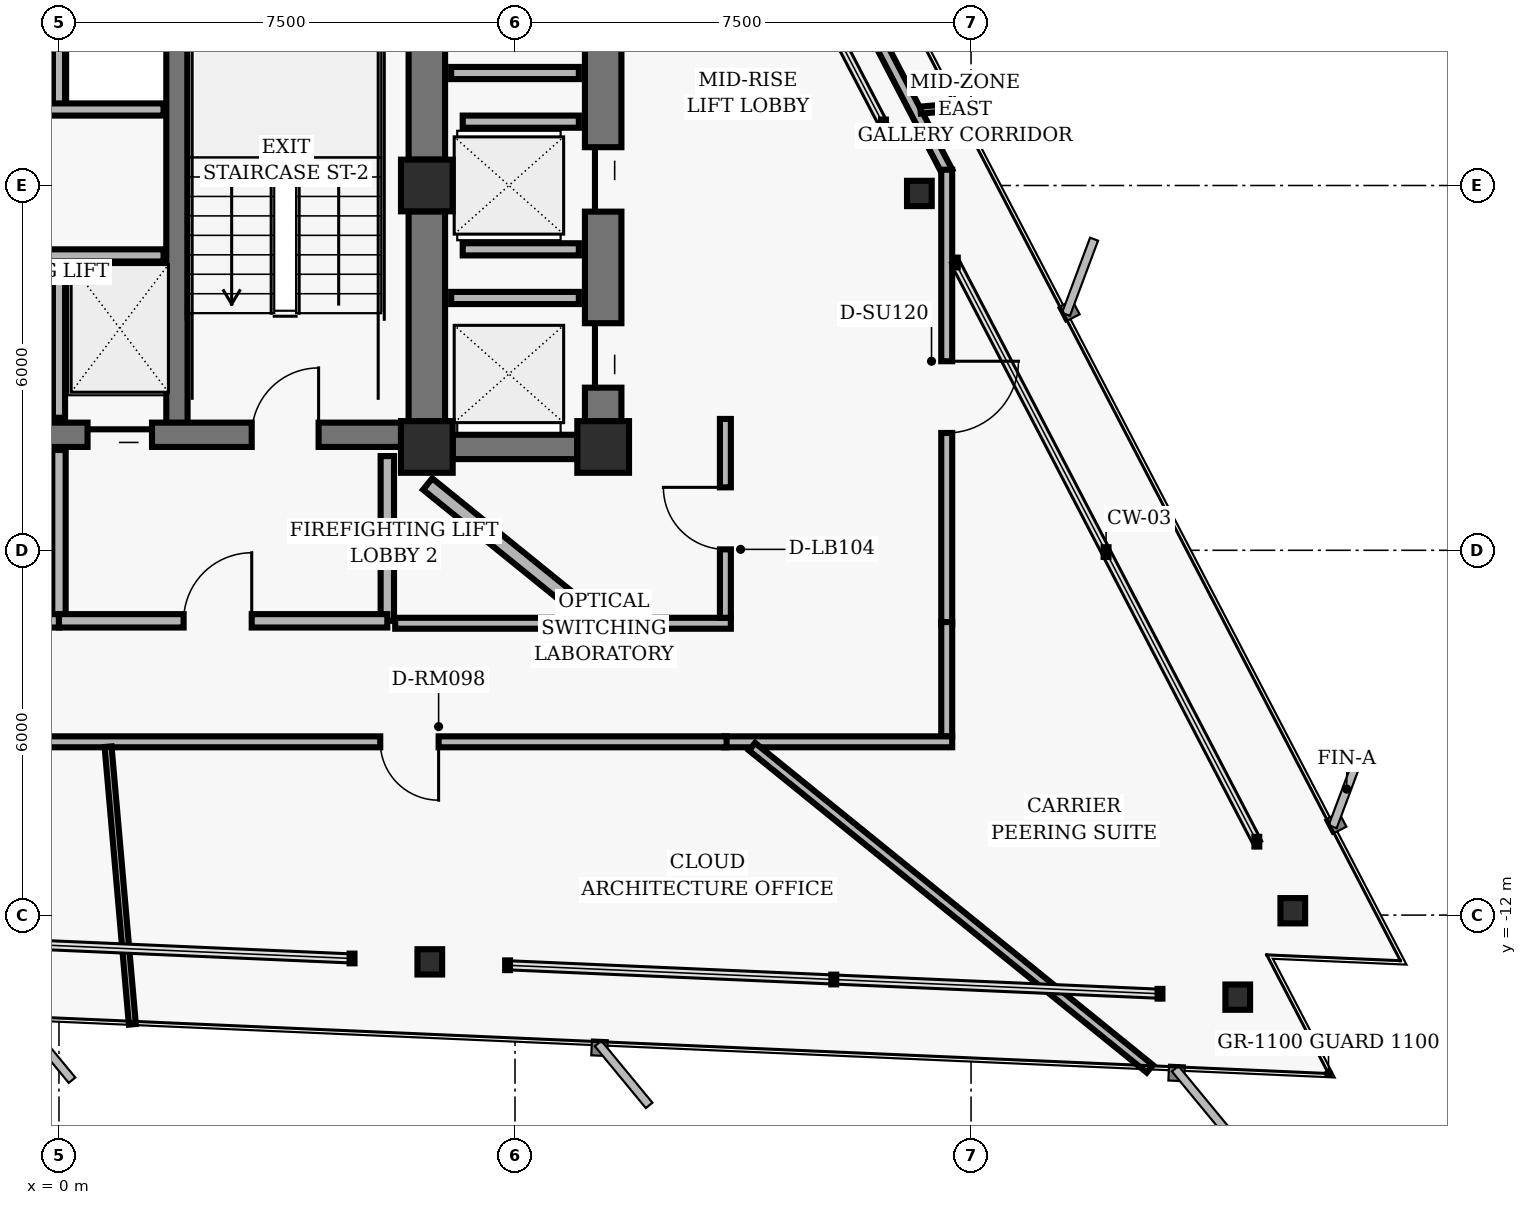
"""IFC4 building model, lengths in metres.
Left out: names, types, materials, properties, quantities, classifications, styles, units other than length and angle.
Written with IfcOpenShell. Run it as: python <this file> out.ifc"""

import sys

from ifc_helpers import new_model, si_unit, direction, frame, frame_2d, origin, origin_2d, place, context, subcontext, project, spatial, rectangle, hollow_rectangle, i_section, extrude, element, fill, save


model = new_model("IFC4")
c1 = context("Model", 3, precision=1e-05, world=origin(), true_north=direction((0.0, 1.0)))
c2 = subcontext(c1, "Body", "Model", "MODEL_VIEW")
j1 = project(units=[si_unit("LENGTHUNIT", "METRE"), si_unit("PLANEANGLEUNIT", "RADIAN")], contexts=[c1])
p1 = place(None, origin())
s1 = spatial("IfcSite", under=j1, at=p1, CompositionType="ELEMENT")
p2 = place(p1, origin())
s2 = spatial("IfcBuilding", under=s1, at=p2, CompositionType="ELEMENT")
p3 = place(p2, frame((0.0, 0.0, 125.92)))
s3 = spatial("IfcBuildingStorey", under=s2, at=p3, CompositionType="ELEMENT", Elevation=125.92)
for number, where, z_axis, x_axis in (
    (1, (6.05, 0.0, 0.0), (0.0, 0.0, 1.0), (1.0, 0.0, 0.0)),
    (2, (6.05, -4.3, 0.0), (0.0, 0.0, 1.0), (1.0, 0.0, 0.0)),
    (3, (8.95, -4.3, 0.0), (0.0, 0.0, 1.0), (1.0, 0.0, 0.0)),
):
    element("IfcColumn", number, at=place(p3, frame(where, z_axis=z_axis, x_axis=x_axis)), inside=s3, PredefinedType="COLUMN", context=c2, shape_type="SweptSolid", body=[
        extrude(hollow_rectangle(XDim=0.85, YDim=0.85, WallThickness=0.055, InnerFilletRadius=0.02, OuterFilletRadius=0.04, at=origin_2d()), origin(), (0.0, 0.0, 1.0), 3.04),
    ])
p4 = place(p3, frame((6.05, 0.425, 0.0), z_axis=(0.0, 0.0, 1.0), x_axis=(0.0, 1.0, 0.0)))
e4 = element("IfcWall", 4, at=p4, inside=s3, PredefinedType="SHEAR", context=c2, shape_type="SweptSolid", body=[
    extrude(rectangle(XDim=3.65, YDim=0.6, at=frame_2d((1.825, 0.0))), origin(), (0.0, 0.0, 1.0), 2.788),
])
p5 = place(p3, frame((6.05, -3.875, 0.0), z_axis=(0.0, 0.0, 1.0), x_axis=(0.0, 1.0, 0.0)))
e5 = element("IfcWall", 5, at=p5, inside=s3, PredefinedType="SHEAR", context=c2, shape_type="SweptSolid", body=[
    extrude(rectangle(XDim=3.45, YDim=0.6, at=frame_2d((1.725, 0.0))), origin(), (0.0, 0.0, 1.0), 2.788),
])
p6 = place(p3, frame((1.94, -4.1, 0.0), z_axis=(0.0, 0.0, 1.0), x_axis=(0.0, 1.0, 0.0)))
e6 = element("IfcWall", 6, at=p6, inside=s3, PredefinedType="SHEAR", context=c2, shape_type="SweptSolid", body=[
    extrude(rectangle(XDim=8.2, YDim=0.35, at=frame_2d((4.1, 0.0))), origin(), (0.0, 0.0, 1.0), 2.788),
])
p7 = place(p3, frame((-5.625, -4.1, 0.0), z_axis=(0.0, 0.0, 1.0), x_axis=(1.0, 0.0, 0.0)))
e7 = element("IfcWall", 7, at=p7, inside=s3, PredefinedType="SHEAR", context=c2, shape_type="SweptSolid", body=[
    extrude(rectangle(XDim=11.25, YDim=0.4, at=frame_2d((5.625, 0.0))), origin(), (0.0, 0.0, 1.0), 2.788),
])
p8 = place(p7, frame((1.355, 0.0, 0.0)))
e8 = element("IfcOpeningElement", 8, at=p8, cuts=e7, PredefinedType="OPENING", context=c2, shape_type="SweptSolid", body=[
    extrude(rectangle(XDim=1.1, YDim=2.04, at=frame_2d((0.55, 1.02))), frame((0.0, 0.21, 0.0), z_axis=(0.0, -1.0, 0.0), x_axis=(1.0, 0.0, 0.0)), (0.0, 0.0, 1.0), 0.42),
])
p9 = place(p7, frame((8.795, 0.0, 0.0)))
e9 = element("IfcOpeningElement", 9, at=p9, cuts=e7, PredefinedType="OPENING", context=c2, shape_type="SweptSolid", body=[
    extrude(rectangle(XDim=1.1, YDim=2.04, at=frame_2d((0.55, 1.02))), frame((0.0, 0.21, 0.0), z_axis=(0.0, -1.0, 0.0), x_axis=(1.0, 0.0, 0.0)), (0.0, 0.0, 1.0), 0.42),
])
p10 = place(p7, frame((4.095, 0.0, 0.0)))
e10 = element("IfcOpeningElement", 10, at=p10, cuts=e7, PredefinedType="OPENING", context=c2, shape_type="SweptSolid", body=[
    extrude(rectangle(XDim=1.06, YDim=2.04, at=frame_2d((0.53, 1.02))), frame((0.0, 0.21, 0.0), z_axis=(0.0, -1.0, 0.0), x_axis=(1.0, 0.0, 0.0)), (0.0, 0.0, 1.0), 0.42),
])
p11 = place(p7, frame((6.095, 0.0, 0.0)))
e11 = element("IfcOpeningElement", 11, at=p11, cuts=e7, PredefinedType="OPENING", context=c2, shape_type="SweptSolid", body=[
    extrude(rectangle(XDim=1.06, YDim=2.04, at=frame_2d((0.53, 1.02))), frame((0.0, 0.21, 0.0), z_axis=(0.0, -1.0, 0.0), x_axis=(1.0, 0.0, 0.0)), (0.0, 0.0, 1.0), 0.42),
])
p12 = place(p3, frame((8.95, -3.875, 0.0), z_axis=(0.0, 0.0, 1.0), x_axis=(0.0, 1.0, 0.0)))
e12 = element("IfcWall", 12, at=p12, inside=s3, PredefinedType="SHEAR", context=c2, shape_type="SweptSolid", body=[
    extrude(rectangle(XDim=7.95, YDim=0.6, at=frame_2d((3.975, 0.0))), origin(), (0.0, 0.0, 1.0), 2.788),
])
p13 = place(p12, frame((0.55, 0.0, 0.0)))
e13 = element("IfcOpeningElement", 13, at=p13, cuts=e12, PredefinedType="OPENING", context=c2, shape_type="SweptSolid", body=[
    extrude(rectangle(XDim=1.06, YDim=2.04, at=frame_2d((0.53, 1.02))), frame((0.0, 0.31, 0.0), z_axis=(0.0, -1.0, 0.0), x_axis=(1.0, 0.0, 0.0)), (0.0, 0.0, 1.0), 0.62),
])
p14 = place(p12, frame((3.445, 0.0, 0.0)))
e14 = element("IfcOpeningElement", 14, at=p14, cuts=e12, PredefinedType="OPENING", context=c2, shape_type="SweptSolid", body=[
    extrude(rectangle(XDim=1.06, YDim=2.04, at=frame_2d((0.53, 1.02))), frame((0.0, 0.31, 0.0), z_axis=(0.0, -1.0, 0.0), x_axis=(1.0, 0.0, 0.0)), (0.0, 0.0, 1.0), 0.62),
])
p15 = place(p12, frame((6.33, 0.0, 0.0)))
e15 = element("IfcOpeningElement", 15, at=p15, cuts=e12, PredefinedType="OPENING", context=c2, shape_type="SweptSolid", body=[
    extrude(rectangle(XDim=1.06, YDim=2.04, at=frame_2d((0.53, 1.02))), frame((0.0, 0.31, 0.0), z_axis=(0.0, -1.0, 0.0), x_axis=(1.0, 0.0, 0.0)), (0.0, 0.0, 1.0), 0.62),
])
p16 = place(p3, frame((6.475, -4.3, 0.0), z_axis=(0.0, 0.0, 1.0), x_axis=(1.0, 0.0, 0.0)))
e16 = element("IfcWall", 16, at=p16, inside=s3, PredefinedType="SHEAR", context=c2, shape_type="SweptSolid", body=[
    extrude(rectangle(XDim=2.05, YDim=0.4, at=frame_2d((1.025, 0.0))), origin(), (0.0, 0.0, 1.0), 2.788),
])
for number, where, z_axis, x_axis in (
    (17, (20.292, -11.928, 0.0), (0.0, 0.0, 1.0), (1.0, 0.0, 0.0)),
    (18, (14.15, -0.131, 0.0), (0.0, 0.0, 1.0), (1.0, 0.0, 0.0)),
    (19, (6.099, -12.769, 0.0), (0.0, 0.0, 1.0), (1.0, 0.0, 0.0)),
    (20, (19.386, -13.349, 0.0), (0.0, 0.0, 1.0), (1.0, 0.0, 0.0)),
):
    element("IfcColumn", number, at=place(p3, frame(where, z_axis=z_axis, x_axis=x_axis)), inside=s3, PredefinedType="COLUMN", context=c2, shape_type="SweptSolid", body=[
        extrude(i_section(OverallWidth=0.406, OverallDepth=0.416, WebThickness=0.03, FlangeThickness=0.048, FilletRadius=0.02, at=origin_2d()), origin(), (0.0, 0.0, 1.0), 3.04),
    ])
p17 = place(p3, frame((0.0, -3.82, 0.0), z_axis=(0.0, 0.0, 1.0), x_axis=(0.0, 1.0, 0.0)))
e21 = element("IfcWall", 21, at=p17, inside=s3, PredefinedType="PARTITIONING", context=c2, shape_type="SweptSolid", body=[
    extrude(rectangle(XDim=2.67, YDim=0.2, at=frame_2d((1.335, 0.0))), origin(), (0.0, 0.0, 1.0), 2.763),
])
p18 = place(p3, frame((-1.72, -1.15, 0.0), z_axis=(0.0, 0.0, 1.0), x_axis=(1.0, 0.0, 0.0)))
e22 = element("IfcWall", 22, at=p18, inside=s3, PredefinedType="PARTITIONING", context=c2, shape_type="SweptSolid", body=[
    extrude(rectangle(XDim=3.44, YDim=0.2, at=frame_2d((1.72, 0.0))), origin(), (0.0, 0.0, 1.0), 2.763),
])
p19 = place(p3, frame((5.4, -7.16, 0.0), z_axis=(0.0, 0.0, 1.0), x_axis=(0.0, 1.0, 0.0)))
e23 = element("IfcWall", 23, at=p19, inside=s3, PredefinedType="PARTITIONING", context=c2, shape_type="SweptSolid", body=[
    extrude(rectangle(XDim=2.71, YDim=0.22, at=frame_2d((1.355, 0.0))), origin(), (0.0, 0.0, 1.0), 2.763),
])
p20 = place(p3, frame((0.0, -7.16, 0.0), z_axis=(0.0, 0.0, 1.0), x_axis=(0.0, 1.0, 0.0)))
e24 = element("IfcWall", 24, at=p20, inside=s3, PredefinedType="PARTITIONING", context=c2, shape_type="SweptSolid", body=[
    extrude(rectangle(XDim=2.81, YDim=0.22, at=frame_2d((1.405, 0.0))), origin(), (0.0, 0.0, 1.0), 2.763),
])
p21 = place(p3, frame((-5.4, -7.16, 0.0), z_axis=(0.0, 0.0, 1.0), x_axis=(1.0, 0.0, 0.0)))
e25 = element("IfcWall", 25, at=p21, inside=s3, PredefinedType="PARTITIONING", context=c2, shape_type="SweptSolid", body=[
    extrude(rectangle(XDim=5.4, YDim=0.22, at=frame_2d((2.7, 0.0))), origin(), (0.0, 0.0, 1.0), 2.33),
])
p22 = place(p21, frame((2.05, 0.0, 0.0)))
e26 = element("IfcOpeningElement", 26, at=p22, cuts=e25, PredefinedType="OPENING", context=c2, shape_type="SweptSolid", body=[
    extrude(rectangle(XDim=1.12, YDim=2.02, at=frame_2d((0.56, 1.01))), frame((0.0, 0.12, 0.0), z_axis=(0.0, -1.0, 0.0), x_axis=(1.0, 0.0, 0.0)), (0.0, 0.0, 1.0), 0.24),
])
p23 = place(p3, frame((0.0, -7.16, 0.0), z_axis=(0.0, 0.0, 1.0), x_axis=(1.0, 0.0, 0.0)))
e27 = element("IfcWall", 27, at=p23, inside=s3, PredefinedType="PARTITIONING", context=c2, shape_type="SweptSolid", body=[
    extrude(rectangle(XDim=5.4, YDim=0.22, at=frame_2d((2.7, 0.0))), origin(), (0.0, 0.0, 1.0), 2.33),
])
p24 = place(p23, frame((2.05, 0.0, 0.0)))
e28 = element("IfcOpeningElement", 28, at=p24, cuts=e27, PredefinedType="OPENING", context=c2, shape_type="SweptSolid", body=[
    extrude(rectangle(XDim=1.12, YDim=2.02, at=frame_2d((0.56, 1.01))), frame((0.0, 0.12, 0.0), z_axis=(0.0, -1.0, 0.0), x_axis=(1.0, 0.0, 0.0)), (0.0, 0.0, 1.0), 0.24),
])
p25 = place(p3, frame((0.0, 1.25, 0.0), z_axis=(0.0, 0.0, 1.0), x_axis=(0.0, 1.0, 0.0)))
e29 = element("IfcWall", 29, at=p25, inside=s3, PredefinedType="PARTITIONING", context=c2, shape_type="SweptSolid", body=[
    extrude(rectangle(XDim=2.77, YDim=0.2, at=frame_2d((1.385, 0.0))), origin(), (0.0, 0.0, 1.0), 2.763),
])
p26 = place(p3, frame((-1.72, 1.25, 0.0), z_axis=(0.0, 0.0, 1.0), x_axis=(1.0, 0.0, 0.0)))
e30 = element("IfcWall", 30, at=p26, inside=s3, PredefinedType="PARTITIONING", context=c2, shape_type="SweptSolid", body=[
    extrude(rectangle(XDim=3.44, YDim=0.2, at=frame_2d((1.72, 0.0))), origin(), (0.0, 0.0, 1.0), 2.763),
])
for number, where, z_axis, x_axis in (
    (31, (6.45, -1.85, 0.0), (0.0, 0.0, 1.0), (1.0, 0.0, 0.0)),
    (32, (6.45, 1.85, 0.0), (0.0, 0.0, 1.0), (1.0, 0.0, 0.0)),
):
    element("IfcWall", number, at=place(p3, frame(where, z_axis=z_axis, x_axis=x_axis)), inside=s3, PredefinedType="PARTITIONING", context=c2, shape_type="SweptSolid", body=[
        extrude(rectangle(XDim=2.1, YDim=0.2, at=frame_2d((1.05, 0.0))), origin(), (0.0, 0.0, 1.0), 2.763),
    ])
for number, where, z_axis, x_axis in (
    (33, (6.64, -1.05, 0.0), (0.0, 0.0, 1.0), (1.0, 0.0, 0.0)),
    (34, (6.64, 1.05, 0.0), (0.0, 0.0, 1.0), (1.0, 0.0, 0.0)),
):
    element("IfcWall", number, at=place(p3, frame(where, z_axis=z_axis, x_axis=x_axis)), inside=s3, PredefinedType="PARTITIONING", context=c2, shape_type="SweptSolid", body=[
        extrude(rectangle(XDim=1.91, YDim=0.2, at=frame_2d((0.955, 0.0))), origin(), (0.0, 0.0, 1.0), 2.763),
    ])
p27 = place(p3, frame((10.003, 9.07, 0.0), z_axis=(0.0, 0.0, 1.0), x_axis=(0.461740291408, -0.887015165198, 0.0)))
e35 = element("IfcWall", 35, at=p27, inside=s3, PredefinedType="PARTITIONING", context=c2, shape_type="SweptSolid", body=[
    extrude(rectangle(XDim=9.976, YDim=0.18, at=frame_2d((4.988, 0.0))), origin(), (0.0, 0.0, 1.0), 2.763),
])
p28 = place(p3, frame((14.6, 0.26, 0.0), z_axis=(0.0, 0.0, 1.0), x_axis=(0.0, -1.0, 0.0)))
e36 = element("IfcWall", 36, at=p28, inside=s3, PredefinedType="PARTITIONING", context=c2, shape_type="SweptSolid", body=[
    extrude(rectangle(XDim=7.479, YDim=0.18, at=frame_2d((3.74, 0.0))), origin(), (0.0, 0.0, 1.0), 2.763),
])
p29 = place(p28, frame((3.15, 0.0, 0.0)))
e37 = element("IfcOpeningElement", 37, at=p29, cuts=e36, PredefinedType="OPENING", context=c2, shape_type="SweptSolid", body=[
    extrude(rectangle(XDim=1.18, YDim=2.02, at=frame_2d((0.59, 1.01))), frame((0.0, 0.1, 0.0), z_axis=(0.0, -1.0, 0.0), x_axis=(1.0, 0.0, 0.0)), (0.0, 0.0, 1.0), 0.2),
])
p30 = place(p3, frame((14.6, -7.18, 0.0), z_axis=(0.0, 0.0, 1.0), x_axis=(0.0, -1.0, 0.0)))
e38 = element("IfcWall", 38, at=p30, inside=s3, PredefinedType="PARTITIONING", context=c2, shape_type="SweptSolid", body=[
    extrude(rectangle(XDim=1.88, YDim=0.18, at=frame_2d((0.94, 0.0))), origin(), (0.0, 0.0, 1.0), 2.763),
])
p31 = place(p3, frame((14.69, -9.15, 0.0), z_axis=(0.0, 0.0, 1.0), x_axis=(-1.0, 0.0, 0.0)))
e39 = element("IfcWall", 39, at=p31, inside=s3, PredefinedType="PARTITIONING", context=c2, shape_type="SweptSolid", body=[
    extrude(rectangle(XDim=3.75, YDim=0.18, at=frame_2d((1.875, 0.0))), origin(), (0.0, 0.0, 1.0), 2.33),
])
p32 = place(p3, frame((10.98, -9.15, 0.0), z_axis=(0.0, 0.0, 1.0), x_axis=(-1.0, 0.0, 0.0)))
e40 = element("IfcWall", 40, at=p32, inside=s3, PredefinedType="PARTITIONING", context=c2, shape_type="SweptSolid", body=[
    extrude(rectangle(XDim=17.5, YDim=0.18, at=frame_2d((8.75, 0.0))), origin(), (0.0, 0.0, 1.0), 2.33),
])
p33 = place(p32, frame((13.116, 0.0, 0.0)))
e41 = element("IfcOpeningElement", 41, at=p33, cuts=e40, PredefinedType="OPENING", context=c2, shape_type="SweptSolid", body=[
    extrude(rectangle(XDim=1.18, YDim=2.02, at=frame_2d((0.59, 1.01))), frame((0.0, 0.1, 0.0), z_axis=(0.0, -1.0, 0.0), x_axis=(1.0, 0.0, 0.0)), (0.0, 0.0, 1.0), 0.2),
])
p34 = place(p32, frame((4.736, 0.0, 0.0)))
e42 = element("IfcOpeningElement", 42, at=p34, cuts=e40, PredefinedType="OPENING", context=c2, shape_type="SweptSolid", body=[
    extrude(rectangle(XDim=0.96, YDim=2.02, at=frame_2d((0.48, 1.01))), frame((0.0, 0.1, 0.0), z_axis=(0.0, -1.0, 0.0), x_axis=(1.0, 0.0, 0.0)), (0.0, 0.0, 1.0), 0.2),
])
p35 = place(p3, frame((5.53, -7.2, 0.0), z_axis=(0.0, 0.0, 1.0), x_axis=(1.0, 0.0, 0.0)))
e43 = element("IfcWall", 43, at=p35, inside=s3, PredefinedType="PARTITIONING", context=c2, shape_type="SweptSolid", body=[
    extrude(rectangle(XDim=5.52, YDim=0.18, at=frame_2d((2.76, 0.0))), origin(), (0.0, 0.0, 1.0), 2.33),
])
p36 = place(p3, frame((10.96, -7.11, 0.0), z_axis=(0.0, 0.0, 1.0), x_axis=(0.0, 1.0, 0.0)))
e44 = element("IfcWall", 44, at=p36, inside=s3, PredefinedType="PARTITIONING", context=c2, shape_type="SweptSolid", body=[
    extrude(rectangle(XDim=3.271, YDim=0.18, at=frame_2d((1.635, 0.0))), origin(), (0.0, 0.0, 1.0), 2.763),
])
p37 = place(p36, frame((1.125, 0.0, 0.0)))
e45 = element("IfcOpeningElement", 45, at=p37, cuts=e44, PredefinedType="OPENING", context=c2, shape_type="SweptSolid", body=[
    extrude(rectangle(XDim=1.02, YDim=2.02, at=frame_2d((0.51, 1.01))), frame((0.0, 0.1, 0.0), z_axis=(0.0, -1.0, 0.0), x_axis=(1.0, 0.0, 0.0)), (0.0, 0.0, 1.0), 0.2),
])
p38 = place(p3, frame((0.808, -9.23, 0.0), z_axis=(0.0, 0.0, 1.0), x_axis=(0.087130613331, -0.996196896311, 0.0)))
e46 = element("IfcWall", 46, at=p38, inside=s3, PredefinedType="MOVABLE", context=c2, shape_type="SweptSolid", body=[
    extrude(rectangle(XDim=4.584, YDim=0.115, at=frame_2d((2.292, 0.0))), origin(), (0.0, 0.0, 1.0), 2.763),
])
p39 = place(p3, frame((6.063, -4.91, 0.0), z_axis=(0.0, 0.0, 1.0), x_axis=(0.777131535724, -0.629338204929, 0.0)))
e47 = element("IfcWall", 47, at=p39, inside=s3, PredefinedType="PARTITIONING", context=c2, shape_type="SweptSolid", body=[
    extrude(rectangle(XDim=3.512, YDim=0.24, at=frame_2d((1.756, 0.0))), origin(), (0.0, 0.0, 1.0), 2.763),
])
p40 = place(p3, frame((11.398, -9.23, 0.0), z_axis=(0.0, 0.0, 1.0), x_axis=(0.777150974354, -0.629314200588, 0.0)))
e48 = element("IfcWall", 48, at=p40, inside=s3, PredefinedType="PARTITIONING", context=c2, shape_type="SweptSolid", body=[
    extrude(rectangle(XDim=8.417, YDim=0.16, at=frame_2d((4.208, 0.0))), origin(), (0.0, 0.0, 1.0), 2.763),
])
p41 = place(p3, frame((14.169, 1.24, 0.0), z_axis=(0.0, 0.0, 1.0), x_axis=(0.996194547312, 0.08715746615, 0.0)))
e49 = element("IfcWall", 49, at=p41, inside=s3, PredefinedType="MOVABLE", context=c2, shape_type="SweptSolid", body=[
    extrude(rectangle(XDim=0.639, YDim=0.115, at=frame_2d((0.319, 0.0))), origin(), (0.0, 0.0, 1.0), 2.763),
])
p42 = place(p9, origin())
e50 = element("IfcDoor", 50, at=p42, inside=s3, OperationType="SINGLE_SWING_RIGHT", PredefinedType="DOOR", context=c2, shape_type="SweptSolid", body=[
    extrude(rectangle(XDim=1.1, YDim=2.04, at=frame_2d((0.55, 1.02))), frame((0.0, 0.025, 0.0), z_axis=(0.0, -1.0, 0.0), x_axis=(1.0, 0.0, 0.0)), (0.0, 0.0, 1.0), 0.05),
])
fill(e9, e50)
p43 = place(p11, origin())
e51 = element("IfcDoor", 51, at=p43, inside=s3, OperationType="SLIDING_TO_RIGHT", PredefinedType="DOOR", context=c2, shape_type="SweptSolid", body=[
    extrude(rectangle(XDim=1.06, YDim=2.04, at=frame_2d((0.53, 1.02))), frame((0.0, 0.025, 0.0), z_axis=(0.0, -1.0, 0.0), x_axis=(1.0, 0.0, 0.0)), (0.0, 0.0, 1.0), 0.05),
])
fill(e11, e51)
p44 = place(p24, origin())
e52 = element("IfcDoor", 52, at=p44, inside=s3, OperationType="SINGLE_SWING_RIGHT", PredefinedType="DOOR", context=c2, shape_type="SweptSolid", body=[
    extrude(rectangle(XDim=1.12, YDim=2.02, at=frame_2d((0.56, 1.01))), frame((0.0, 0.025, 0.0), z_axis=(0.0, -1.0, 0.0), x_axis=(1.0, 0.0, 0.0)), (0.0, 0.0, 1.0), 0.05),
])
fill(e28, e52)
p45 = place(p13, origin())
e53 = element("IfcDoor", 53, at=p45, inside=s3, OperationType="SLIDING_TO_LEFT", PredefinedType="DOOR", context=c2, shape_type="SweptSolid", body=[
    extrude(rectangle(XDim=1.06, YDim=2.04, at=frame_2d((0.53, 1.02))), frame((0.0, 0.025, 0.0), z_axis=(0.0, -1.0, 0.0), x_axis=(1.0, 0.0, 0.0)), (0.0, 0.0, 1.0), 0.05),
])
fill(e13, e53)
p46 = place(p14, origin())
e54 = element("IfcDoor", 54, at=p46, inside=s3, OperationType="SLIDING_TO_RIGHT", PredefinedType="DOOR", context=c2, shape_type="SweptSolid", body=[
    extrude(rectangle(XDim=1.06, YDim=2.04, at=frame_2d((0.53, 1.02))), frame((0.0, 0.025, 0.0), z_axis=(0.0, -1.0, 0.0), x_axis=(1.0, 0.0, 0.0)), (0.0, 0.0, 1.0), 0.05),
])
fill(e14, e54)
p47 = place(p34, origin())
e55 = element("IfcDoor", 55, at=p47, inside=s3, OperationType="SINGLE_SWING_LEFT", PredefinedType="DOOR", context=c2, shape_type="SweptSolid", body=[
    extrude(rectangle(XDim=0.96, YDim=2.02, at=frame_2d((0.48, 1.01))), frame((0.0, 0.025, 0.0), z_axis=(0.0, -1.0, 0.0), x_axis=(1.0, 0.0, 0.0)), (0.0, 0.0, 1.0), 0.05),
])
fill(e42, e55)
p48 = place(p37, origin())
e56 = element("IfcDoor", 56, at=p48, inside=s3, OperationType="SINGLE_SWING_RIGHT", PredefinedType="DOOR", context=c2, shape_type="SweptSolid", body=[
    extrude(rectangle(XDim=1.02, YDim=2.02, at=frame_2d((0.51, 1.01))), frame((0.0, 0.025, 0.0), z_axis=(0.0, -1.0, 0.0), x_axis=(1.0, 0.0, 0.0)), (0.0, 0.0, 1.0), 0.05),
])
fill(e45, e56)
p49 = place(p29, origin())
e57 = element("IfcDoor", 57, at=p49, inside=s3, OperationType="SINGLE_SWING_LEFT", PredefinedType="DOOR", context=c2, shape_type="SweptSolid", body=[
    extrude(rectangle(XDim=1.18, YDim=2.02, at=frame_2d((0.59, 1.01))), frame((0.0, 0.025, 0.0), z_axis=(0.0, -1.0, 0.0), x_axis=(1.0, 0.0, 0.0)), (0.0, 0.0, 1.0), 0.05),
])
fill(e37, e57)
save(model, sys.argv[1])
